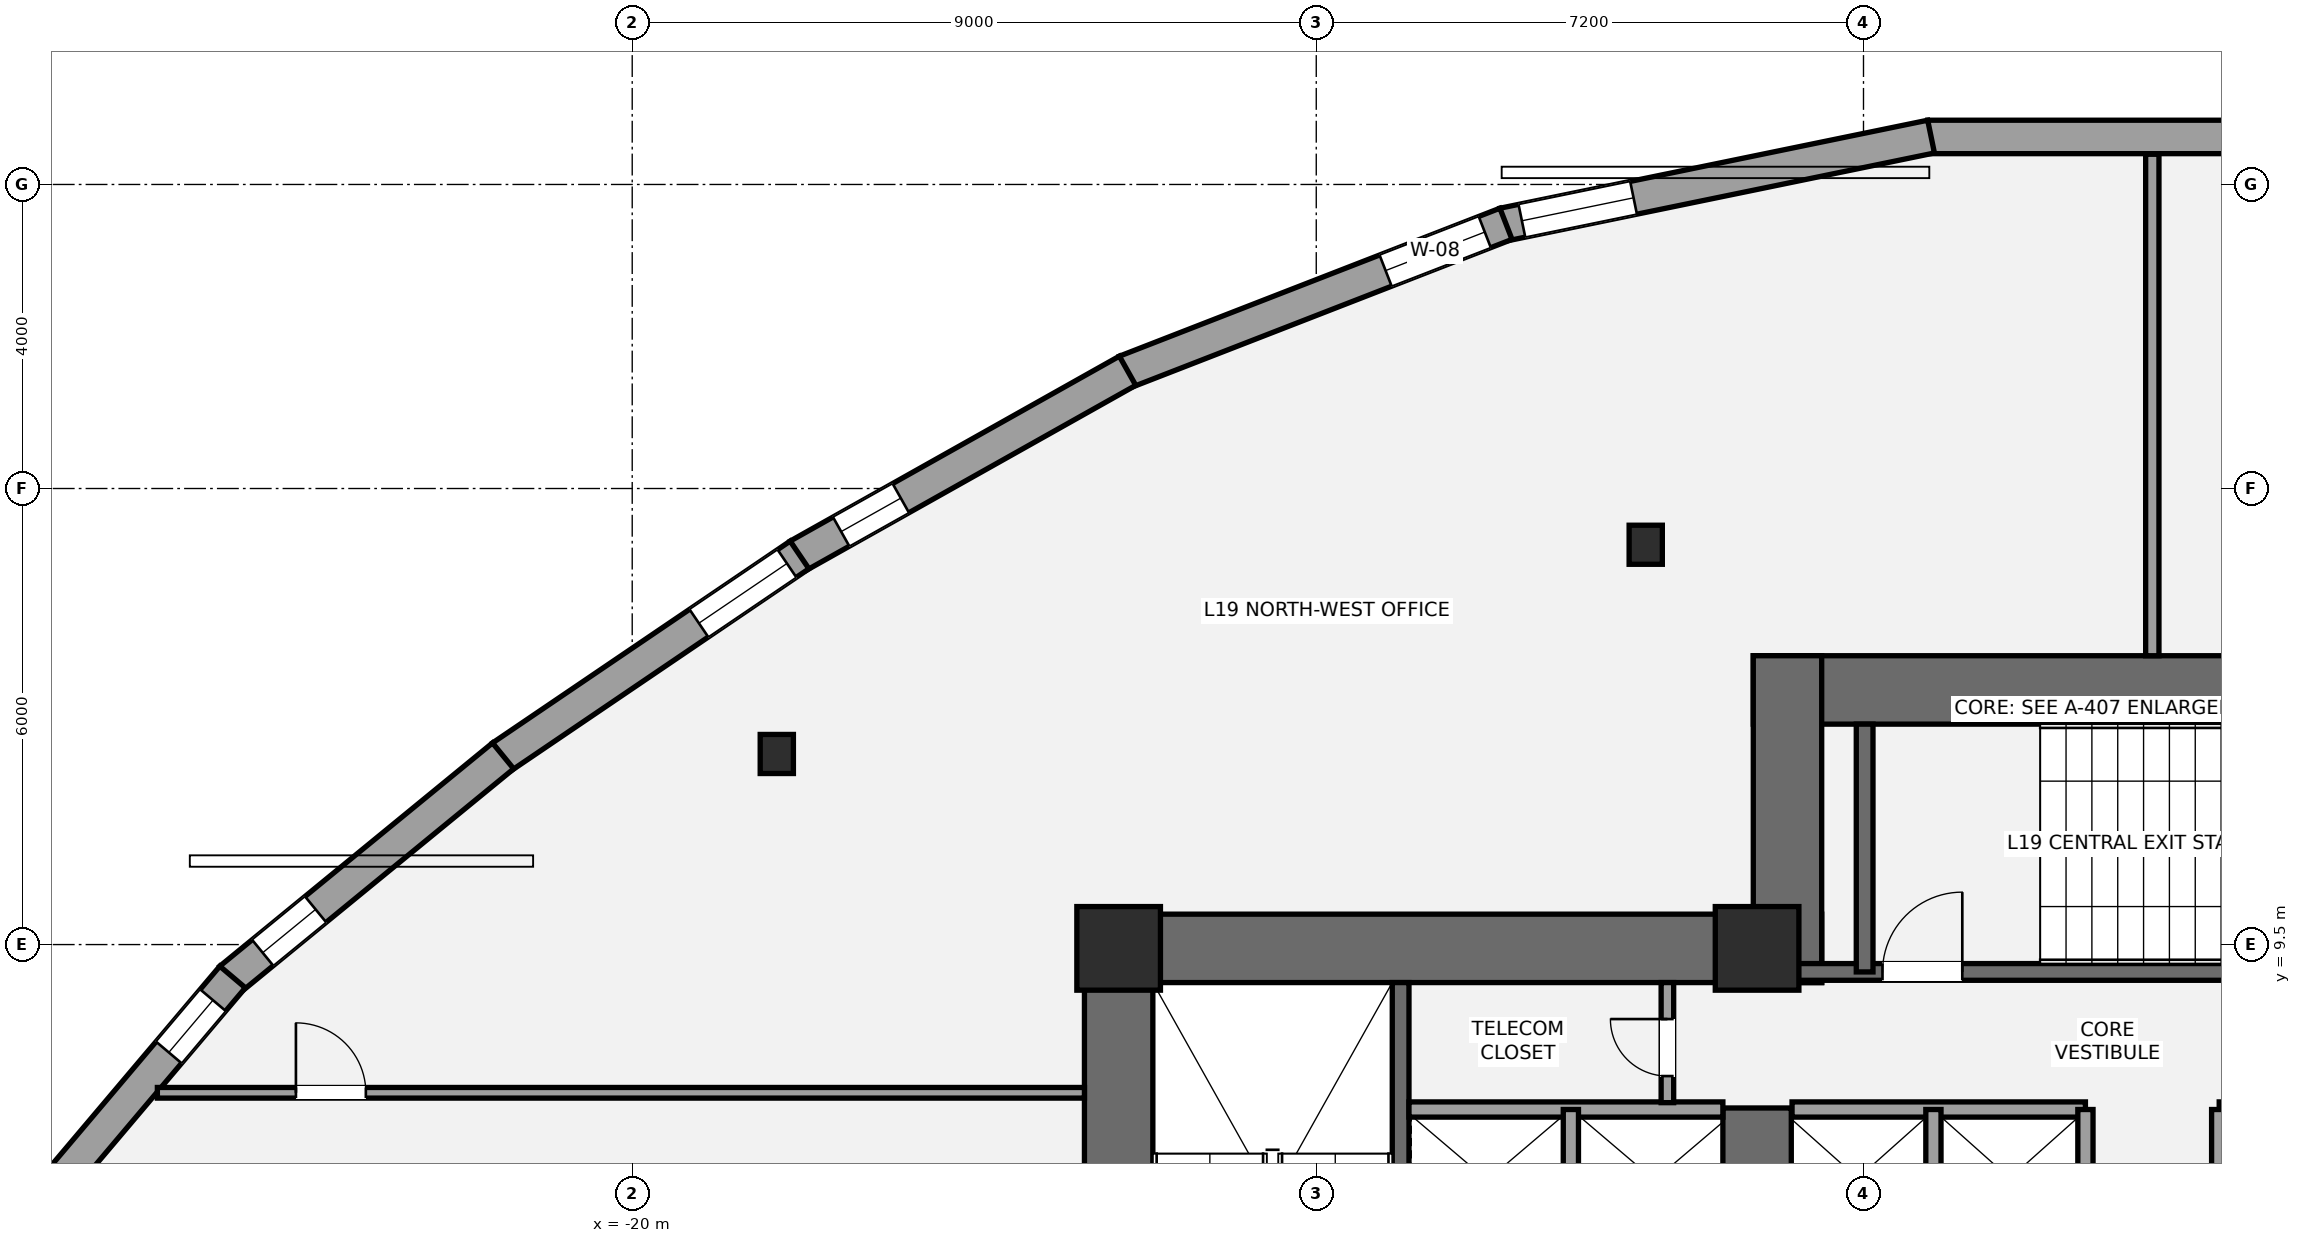
"""IFC4 building model, lengths in metres.
Left out: names, types, materials, properties, quantities, classifications, styles, units other than length and angle.
Written with IfcOpenShell. Run it as: python <this file> out.ifc"""

import sys

from ifc_helpers import new_model, si_unit, direction, frame, frame_2d, origin, origin_2d, place, context, subcontext, project, spatial, rectangle, i_section, extrude, element, fill, save


model = new_model("IFC4")
c1 = context("Model", 3, precision=1e-05, world=origin(), true_north=direction((0.0, 1.0)))
c2 = subcontext(c1, "Body", "Model", "MODEL_VIEW")
j1 = project(units=[si_unit("LENGTHUNIT", "METRE"), si_unit("PLANEANGLEUNIT", "RADIAN")], contexts=[c1])
p1 = place(None, origin())
s1 = spatial("IfcSite", under=j1, at=p1, CompositionType="ELEMENT")
p2 = place(p1, origin())
s2 = spatial("IfcBuilding", under=s1, at=p2, CompositionType="ELEMENT")
p3 = place(p2, frame((0.0, 0.0, 73.8)))
s3 = spatial("IfcBuildingStorey", under=s2, at=p3, CompositionType="ELEMENT", Elevation=73.8)
p4 = place(p3, frame((-13.6, 0.95, 0.0), z_axis=(0.0, 0.0, 1.0), x_axis=(0.0, 1.0, 0.0)))
e1 = element("IfcWall", 1, at=p4, inside=s3, PredefinedType="SHEAR", context=c2, shape_type="SweptSolid", body=[
    extrude(rectangle(XDim=8.95, YDim=0.9, at=frame_2d((4.475, 0.0))), origin(), (0.0, 0.0, 1.0), 3.6),
])
p5 = place(p3, frame((-14.05, 9.45, 0.0), z_axis=(0.0, 0.0, 1.0), x_axis=(1.0, 0.0, 0.0)))
e2 = element("IfcWall", 2, at=p5, inside=s3, PredefinedType="SHEAR", context=c2, shape_type="SweptSolid", body=[
    extrude(rectangle(XDim=9.7, YDim=0.9, at=frame_2d((4.85, 0.0))), origin(), (0.0, 0.0, 1.0), 3.6),
])
p6 = place(p3, frame((-5.2, 5.35, 0.0), z_axis=(0.0, 0.0, 1.0), x_axis=(0.0, 1.0, 0.0)))
e3 = element("IfcWall", 3, at=p6, inside=s3, PredefinedType="SHEAR", context=c2, shape_type="SweptSolid", body=[
    extrude(rectangle(XDim=2.0, YDim=0.9, at=frame_2d((1.0, 0.0))), origin(), (0.0, 0.0, 1.0), 3.6),
])
p7 = place(p3, frame((-9.89, 1.85, 0.0), z_axis=(0.0, 0.0, 1.0), x_axis=(0.0, 1.0, 0.0)))
e4 = element("IfcWall", 4, at=p7, inside=s3, PredefinedType="SHEAR", context=c2, shape_type="SweptSolid", body=[
    extrude(rectangle(XDim=7.15, YDim=0.22, at=frame_2d((3.575, 0.0))), origin(), (0.0, 0.0, 1.0), 3.6),
])
p8 = place(p3, frame((-5.25, 12.85, 0.0), z_axis=(0.0, 0.0, 1.0), x_axis=(1.0, 0.0, 0.0)))
e5 = element("IfcWall", 5, at=p8, inside=s3, PredefinedType="SHEAR", context=c2, shape_type="SweptSolid", body=[
    extrude(rectangle(XDim=10.5, YDim=0.9, at=frame_2d((5.25, 0.0))), origin(), (0.0, 0.0, 1.0), 3.6),
])
p9 = place(p3, frame((-4.8, 9.0, 0.0), z_axis=(0.0, 0.0, 1.0), x_axis=(0.0, 1.0, 0.0)))
e6 = element("IfcWall", 6, at=p9, inside=s3, PredefinedType="SHEAR", context=c2, shape_type="SweptSolid", body=[
    extrude(rectangle(XDim=4.3, YDim=0.9, at=frame_2d((2.15, 0.0))), origin(), (0.0, 0.0, 1.0), 3.6),
])
p10 = place(p3, frame((-4.7, 9.14, 0.0), z_axis=(0.0, 0.0, 1.0), x_axis=(1.0, 0.0, 0.0)))
e7 = element("IfcWall", 7, at=p10, inside=s3, PredefinedType="SHEAR", context=c2, shape_type="SweptSolid", body=[
    extrude(rectangle(XDim=9.3, YDim=0.22, at=frame_2d((4.65, 0.0))), origin(), (0.0, 0.0, 1.0), 3.6),
])
p11 = place(p10, frame((1.15, 0.0, 0.0)))
e8 = element("IfcOpeningElement", 8, at=p11, cuts=e7, PredefinedType="OPENING", context=c2, shape_type="SweptSolid", body=[
    extrude(rectangle(XDim=1.05, YDim=2.15, at=frame_2d((0.525, 1.075))), frame((0.0, 0.12, 0.0), z_axis=(0.0, -1.0, 0.0), x_axis=(1.0, 0.0, 0.0)), (0.0, 0.0, 1.0), 0.24),
])
p12 = place(p3, frame((-3.785, 9.14, 0.0), z_axis=(0.0, 0.0, 1.0), x_axis=(0.0, 1.0, 0.0)))
e9 = element("IfcWall", 9, at=p12, inside=s3, PredefinedType="SHEAR", context=c2, shape_type="SweptSolid", body=[
    extrude(rectangle(XDim=3.26, YDim=0.22, at=frame_2d((1.63, 0.0))), origin(), (0.0, 0.0, 1.0), 3.6),
])
for number, where, z_axis, x_axis in (
    (10, (-13.6, 9.45, 0.0), (0.0, 0.0, 1.0), (1.0, 0.0, 0.0)),
    (11, (-5.2, 9.45, 0.0), (0.0, 0.0, 1.0), (1.0, 0.0, 0.0)),
):
    element("IfcColumn", number, at=place(p3, frame(where, z_axis=z_axis, x_axis=x_axis)), inside=s3, PredefinedType="COLUMN", context=c2, shape_type="SweptSolid", body=[
        extrude(rectangle(XDim=1.1, YDim=1.1, at=origin_2d()), origin(), (0.0, 0.0, 1.0), 3.6),
    ])
for number, where, z_axis, x_axis in (
    (12, (-6.665, 14.76, 0.0), (0.0, 0.0, 1.0), (1.0, 0.0, 0.0)),
    (13, (-18.098, 12.007, 0.0), (0.0, 0.0, 1.0), (1.0, 0.0, 0.0)),
):
    element("IfcColumn", number, at=place(p3, frame(where, z_axis=z_axis, x_axis=x_axis)), inside=s3, PredefinedType="COLUMN", context=c2, shape_type="SweptSolid", body=[
        extrude(i_section(OverallWidth=0.437, OverallDepth=0.514, WebThickness=0.061, FlangeThickness=0.097, at=origin_2d()), origin(), (0.0, 0.0, 1.0), 3.6),
    ])
p13 = place(p3, frame((-2.955, 20.125, 0.0), z_axis=(0.0, 0.0, 1.0), x_axis=(1.0, 0.0, 0.0)))
e14 = element("IfcWall", 14, at=p13, inside=s3, PredefinedType="STANDARD", context=c2, shape_type="SweptSolid", body=[
    extrude(rectangle(XDim=5.91, YDim=0.44, at=frame_2d((2.955, 0.0))), origin(), (0.0, 0.0, 1.0), 2.493),
])
p14 = place(p13, frame((4.062, 0.0, 0.65)))
e15 = element("IfcOpeningElement", 15, at=p14, cuts=e14, PredefinedType="OPENING", context=c2, shape_type="SweptSolid", body=[
    extrude(rectangle(XDim=1.5, YDim=1.7, at=frame_2d((0.75, 0.85))), frame((0.0, 0.23, 0.0), z_axis=(0.0, -1.0, 0.0), x_axis=(1.0, 0.0, 0.0)), (0.0, 0.0, 1.0), 0.46),
])
p15 = place(p3, frame((-8.539, 18.972, 0.0), z_axis=(0.0, 0.0, 1.0), x_axis=(0.979485663347, 0.201513858821, 0.0)))
e16 = element("IfcWall", 16, at=p15, inside=s3, PredefinedType="STANDARD", context=c2, shape_type="SweptSolid", body=[
    extrude(rectangle(XDim=5.746, YDim=0.44, at=frame_2d((2.873, 0.0))), origin(), (0.0, 0.0, 1.0), 2.489),
])
p16 = place(p15, frame((0.25, 0.0, 0.65)))
e17 = element("IfcOpeningElement", 17, at=p16, cuts=e16, PredefinedType="OPENING", context=c2, shape_type="SweptSolid", body=[
    extrude(rectangle(XDim=1.5, YDim=1.7, at=frame_2d((0.75, 0.85))), frame((0.0, 0.23, 0.0), z_axis=(0.0, -1.0, 0.0), x_axis=(1.0, 0.0, 0.0)), (0.0, 0.0, 1.0), 0.46),
])
p17 = place(p3, frame((-13.511, 17.036, 0.0), z_axis=(0.0, 0.0, 1.0), x_axis=(0.932040489001, 0.362354145641, 0.0)))
e18 = element("IfcWall", 18, at=p17, inside=s3, PredefinedType="STANDARD", context=c2, shape_type="SweptSolid", body=[
    extrude(rectangle(XDim=5.372, YDim=0.44, at=frame_2d((2.686, 0.0))), origin(), (0.0, 0.0, 1.0), 2.489),
])
p18 = place(p17, frame((3.673, 0.0, 0.58)))
e19 = element("IfcOpeningElement", 19, at=p18, cuts=e18, PredefinedType="OPENING", context=c2, shape_type="SweptSolid", body=[
    extrude(rectangle(XDim=1.4, YDim=1.55, at=frame_2d((0.7, 0.775))), frame((0.0, 0.23, 0.0), z_axis=(0.0, -1.0, 0.0), x_axis=(1.0, 0.0, 0.0)), (0.0, 0.0, 1.0), 0.46),
])
p19 = place(p3, frame((-17.814, 14.616, 0.0), z_axis=(0.0, 0.0, 1.0), x_axis=(0.871887714573, 0.489705843519, 0.0)))
e20 = element("IfcWall", 20, at=p19, inside=s3, PredefinedType="STANDARD", context=c2, shape_type="SweptSolid", body=[
    extrude(rectangle(XDim=4.968, YDim=0.44, at=frame_2d((2.484, 0.0))), origin(), (0.0, 0.0, 1.0), 2.489),
])
p20 = place(p19, frame((0.646, 0.0, 0.58)))
e21 = element("IfcOpeningElement", 21, at=p20, cuts=e20, PredefinedType="OPENING", context=c2, shape_type="SweptSolid", body=[
    extrude(rectangle(XDim=0.9, YDim=1.35, at=frame_2d((0.45, 0.675))), frame((0.0, 0.23, 0.0), z_axis=(0.0, -1.0, 0.0), x_axis=(1.0, 0.0, 0.0)), (0.0, 0.0, 1.0), 0.46),
])
p21 = place(p3, frame((-21.715, 11.97, 0.0), z_axis=(0.0, 0.0, 1.0), x_axis=(0.827650405372, 0.561243981249, 0.0)))
e22 = element("IfcWall", 22, at=p21, inside=s3, PredefinedType="STANDARD", context=c2, shape_type="SweptSolid", body=[
    extrude(rectangle(XDim=4.731, YDim=0.44, at=frame_2d((2.366, 0.0))), origin(), (0.0, 0.0, 1.0), 2.493),
])
p22 = place(p21, frame((3.132, 0.0, 0.45)))
e23 = element("IfcOpeningElement", 23, at=p22, cuts=e22, PredefinedType="OPENING", context=c2, shape_type="SweptSolid", body=[
    extrude(rectangle(XDim=1.4, YDim=1.55, at=frame_2d((0.7, 0.775))), frame((0.0, 0.23, 0.0), z_axis=(0.0, -1.0, 0.0), x_axis=(1.0, 0.0, 0.0)), (0.0, 0.0, 1.0), 0.46),
])
p23 = place(p3, frame((-25.287, 9.045, 0.0), z_axis=(0.0, 0.0, 1.0), x_axis=(0.7737766342, 0.63345853879, 0.0)))
e24 = element("IfcWall", 24, at=p23, inside=s3, PredefinedType="STANDARD", context=c2, shape_type="SweptSolid", body=[
    extrude(rectangle(XDim=4.637, YDim=0.44, at=frame_2d((2.318, 0.0))), origin(), (0.0, 0.0, 1.0), 2.489),
])
p24 = place(p23, frame((0.549, 0.0, 0.58)))
e25 = element("IfcOpeningElement", 25, at=p24, cuts=e24, PredefinedType="OPENING", context=c2, shape_type="SweptSolid", body=[
    extrude(rectangle(XDim=0.9, YDim=1.35, at=frame_2d((0.45, 0.675))), frame((0.0, 0.23, 0.0), z_axis=(0.0, -1.0, 0.0), x_axis=(1.0, 0.0, 0.0)), (0.0, 0.0, 1.0), 0.46),
])
p25 = place(p3, frame((-28.129, 5.678, 0.0), z_axis=(0.0, 0.0, 1.0), x_axis=(0.645698517297, 0.763592446767, 0.0)))
e26 = element("IfcWall", 26, at=p25, inside=s3, PredefinedType="STANDARD", context=c2, shape_type="SweptSolid", body=[
    extrude(rectangle(XDim=4.446, YDim=0.44, at=frame_2d((2.223, 0.0))), origin(), (0.0, 0.0, 1.0), 2.489),
])
p26 = place(p25, frame((3.146, 0.0, 0.58)))
e27 = element("IfcOpeningElement", 27, at=p26, cuts=e26, PredefinedType="OPENING", context=c2, shape_type="SweptSolid", body=[
    extrude(rectangle(XDim=0.9, YDim=1.35, at=frame_2d((0.45, 0.675))), frame((0.0, 0.23, 0.0), z_axis=(0.0, -1.0, 0.0), x_axis=(1.0, 0.0, 0.0)), (0.0, 0.0, 1.0), 0.46),
])
p27 = place(p3, frame((-9.78, 7.33, 0.0), z_axis=(0.0, 0.0, 1.0), x_axis=(1.0, 0.0, 0.0)))
e28 = element("IfcWall", 28, at=p27, inside=s3, PredefinedType="SOLIDWALL", context=c2, shape_type="SweptSolid", body=[
    extrude(rectangle(XDim=4.13, YDim=0.2, at=frame_2d((2.065, 0.0))), origin(), (0.0, 0.0, 1.0), 3.36),
])
p28 = place(p3, frame((-7.65, 5.47, 0.0), z_axis=(0.0, 0.0, 1.0), x_axis=(0.0, 1.0, 0.0)))
e29 = element("IfcWall", 29, at=p28, inside=s3, PredefinedType="SOLIDWALL", context=c2, shape_type="SweptSolid", body=[
    extrude(rectangle(XDim=1.86, YDim=0.2, at=frame_2d((0.93, 0.0))), origin(), (0.0, 0.0, 1.0), 3.36),
])
for number, where, z_axis, x_axis in (
    (30, (-4.74, 7.33, 0.0), (0.0, 0.0, 1.0), (1.0, 0.0, 0.0)),
    (31, (0.88, 7.33, 0.0), (0.0, 0.0, 1.0), (1.0, 0.0, 0.0)),
):
    element("IfcWall", number, at=place(p3, frame(where, z_axis=z_axis, x_axis=x_axis)), inside=s3, PredefinedType="SOLIDWALL", context=c2, shape_type="SweptSolid", body=[
        extrude(rectangle(XDim=3.86, YDim=0.2, at=frame_2d((1.93, 0.0))), origin(), (0.0, 0.0, 1.0), 3.36),
    ])
for number, where, z_axis, x_axis in (
    (32, (-2.88, 5.52, 0.0), (0.0, 0.0, 1.0), (0.0, 1.0, 0.0)),
    (33, (-0.88, 5.52, 0.0), (0.0, 0.0, 1.0), (0.0, 1.0, 0.0)),
    (34, (0.88, 5.52, 0.0), (0.0, 0.0, 1.0), (0.0, 1.0, 0.0)),
):
    element("IfcWall", number, at=place(p3, frame(where, z_axis=z_axis, x_axis=x_axis)), inside=s3, PredefinedType="SOLIDWALL", context=c2, shape_type="SweptSolid", body=[
        extrude(rectangle(XDim=1.81, YDim=0.2, at=frame_2d((0.905, 0.0))), origin(), (0.0, 0.0, 1.0), 3.36),
    ])
p29 = place(p3, frame((-6.38, 7.42, 0.0), z_axis=(0.0, 0.0, 1.0), x_axis=(0.0, 1.0, 0.0)))
e35 = element("IfcWall", 35, at=p29, inside=s3, PredefinedType="PARTITIONING", context=c2, shape_type="SweptSolid", body=[
    extrude(rectangle(XDim=1.58, YDim=0.165, at=frame_2d((0.79, 0.0))), origin(), (0.0, 0.0, 1.0), 3.36),
])
p30 = place(p29, frame((0.35, 0.0, 0.0)))
e36 = element("IfcOpeningElement", 36, at=p30, cuts=e35, PredefinedType="OPENING", context=c2, shape_type="SweptSolid", body=[
    extrude(rectangle(XDim=0.75, YDim=2.1, at=frame_2d((0.375, 1.05))), frame((0.0, 0.093, 0.0), z_axis=(0.0, -1.0, 0.0), x_axis=(1.0, 0.0, 0.0)), (0.0, 0.0, 1.0), 0.185),
])
p31 = place(p3, frame((-26.248, 7.55, 0.0), z_axis=(0.0, 0.0, 1.0), x_axis=(1.0, 0.0, 0.0)))
e37 = element("IfcWall", 37, at=p31, inside=s3, PredefinedType="PARTITIONING", context=c2, shape_type="SweptSolid", body=[
    extrude(rectangle(XDim=12.198, YDim=0.14, at=frame_2d((6.099, 0.0))), origin(), (0.0, 0.0, 1.0), 2.813),
])
p32 = place(p31, frame((1.823, 0.0, 0.0)))
e38 = element("IfcOpeningElement", 38, at=p32, cuts=e37, PredefinedType="OPENING", context=c2, shape_type="SweptSolid", body=[
    extrude(rectangle(XDim=0.92, YDim=2.15, at=frame_2d((0.46, 1.075))), frame((0.0, 0.08, 0.0), z_axis=(0.0, -1.0, 0.0), x_axis=(1.0, 0.0, 0.0)), (0.0, 0.0, 1.0), 0.16),
])
p33 = place(p3, frame((0.0, 13.3, 0.0), z_axis=(0.0, 0.0, 1.0), x_axis=(0.0, 1.0, 0.0)))
e39 = element("IfcWall", 39, at=p33, inside=s3, PredefinedType="PARTITIONING", context=c2, shape_type="SweptSolid", body=[
    extrude(rectangle(XDim=6.597, YDim=0.175, at=frame_2d((3.299, 0.0))), origin(), (0.0, 0.0, 1.0), 3.36),
])
p34 = place(p16, origin())
e40 = element("IfcWindow", 40, at=p34, inside=s3, PartitioningType="SINGLE_PANEL", PredefinedType="WINDOW", context=c2, shape_type="SweptSolid", body=[
    extrude(rectangle(XDim=1.5, YDim=1.7, at=frame_2d((0.75, 0.85))), frame((0.0, -0.01, 0.0), z_axis=(0.0, -1.0, 0.0), x_axis=(1.0, 0.0, 0.0)), (0.0, 0.0, 1.0), 0.06),
])
fill(e17, e40)
p35 = place(p18, origin())
e41 = element("IfcWindow", 41, at=p35, inside=s3, PartitioningType="SINGLE_PANEL", PredefinedType="WINDOW", context=c2, shape_type="SweptSolid", body=[
    extrude(rectangle(XDim=1.4, YDim=1.55, at=frame_2d((0.7, 0.775))), frame((0.0, -0.01, 0.0), z_axis=(0.0, -1.0, 0.0), x_axis=(1.0, 0.0, 0.0)), (0.0, 0.0, 1.0), 0.06),
])
fill(e19, e41)
p36 = place(p20, origin())
e42 = element("IfcWindow", 42, at=p36, inside=s3, PartitioningType="SINGLE_PANEL", PredefinedType="WINDOW", context=c2, shape_type="SweptSolid", body=[
    extrude(rectangle(XDim=0.9, YDim=1.35, at=frame_2d((0.45, 0.675))), frame((0.0, -0.01, 0.0), z_axis=(0.0, -1.0, 0.0), x_axis=(1.0, 0.0, 0.0)), (0.0, 0.0, 1.0), 0.06),
])
fill(e21, e42)
p37 = place(p22, origin())
e43 = element("IfcWindow", 43, at=p37, inside=s3, PartitioningType="SINGLE_PANEL", PredefinedType="WINDOW", context=c2, shape_type="SweptSolid", body=[
    extrude(rectangle(XDim=1.4, YDim=1.55, at=frame_2d((0.7, 0.775))), frame((0.0, -0.01, 0.0), z_axis=(0.0, -1.0, 0.0), x_axis=(1.0, 0.0, 0.0)), (0.0, 0.0, 1.0), 0.06),
])
fill(e23, e43)
p38 = place(p24, origin())
e44 = element("IfcWindow", 44, at=p38, inside=s3, PartitioningType="SINGLE_PANEL", PredefinedType="WINDOW", context=c2, shape_type="SweptSolid", body=[
    extrude(rectangle(XDim=0.9, YDim=1.35, at=frame_2d((0.45, 0.675))), frame((0.0, -0.01, 0.0), z_axis=(0.0, -1.0, 0.0), x_axis=(1.0, 0.0, 0.0)), (0.0, 0.0, 1.0), 0.06),
])
fill(e25, e44)
p39 = place(p26, origin())
e45 = element("IfcWindow", 45, at=p39, inside=s3, PartitioningType="SINGLE_PANEL", PredefinedType="WINDOW", context=c2, shape_type="SweptSolid", body=[
    extrude(rectangle(XDim=0.9, YDim=1.35, at=frame_2d((0.45, 0.675))), frame((0.0, -0.01, 0.0), z_axis=(0.0, -1.0, 0.0), x_axis=(1.0, 0.0, 0.0)), (0.0, 0.0, 1.0), 0.06),
])
fill(e27, e45)
p40 = place(p11, origin())
e46 = element("IfcDoor", 46, at=p40, inside=s3, OperationType="SINGLE_SWING_RIGHT", PredefinedType="DOOR", context=c2, shape_type="SweptSolid", body=[
    extrude(rectangle(XDim=1.05, YDim=2.15, at=frame_2d((0.525, 1.075))), frame((0.0, 0.025, 0.0), z_axis=(0.0, -1.0, 0.0), x_axis=(1.0, 0.0, 0.0)), (0.0, 0.0, 1.0), 0.05),
])
fill(e8, e46)
p41 = place(p30, origin())
e47 = element("IfcDoor", 47, at=p41, inside=s3, OperationType="SINGLE_SWING_RIGHT", PredefinedType="DOOR", context=c2, shape_type="SweptSolid", body=[
    extrude(rectangle(XDim=0.75, YDim=2.1, at=frame_2d((0.375, 1.05))), frame((0.0, 0.025, 0.0), z_axis=(0.0, -1.0, 0.0), x_axis=(1.0, 0.0, 0.0)), (0.0, 0.0, 1.0), 0.05),
])
fill(e36, e47)
p42 = place(p32, origin())
e48 = element("IfcDoor", 48, at=p42, inside=s3, OperationType="SINGLE_SWING_LEFT", PredefinedType="DOOR", context=c2, shape_type="SweptSolid", body=[
    extrude(rectangle(XDim=0.92, YDim=2.15, at=frame_2d((0.46, 1.075))), frame((0.0, 0.025, 0.0), z_axis=(0.0, -1.0, 0.0), x_axis=(1.0, 0.0, 0.0)), (0.0, 0.0, 1.0), 0.05),
])
fill(e38, e48)
save(model, sys.argv[1])
